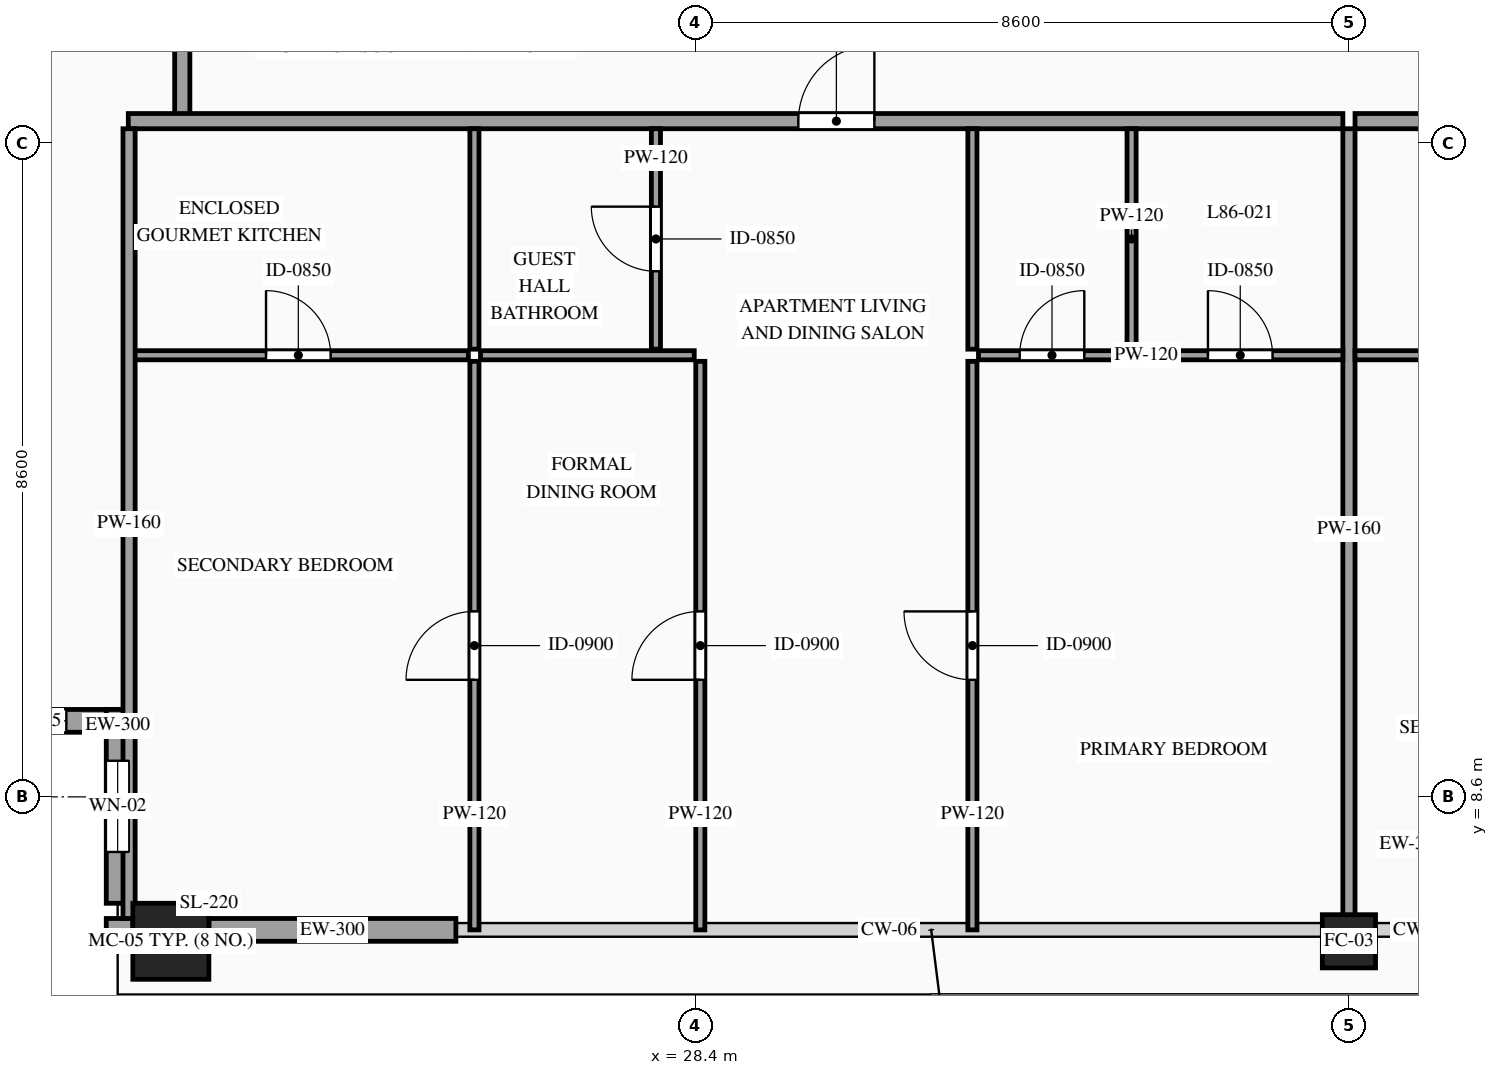
"""IFC4 building model, lengths in metres.
Left out: names, types, materials, properties, quantities, classifications, styles, units other than length and angle.
Written with IfcOpenShell. Run it as: python <this file> out.ifc"""

import sys

from ifc_helpers import new_model, si_unit, direction, frame, frame_2d, origin, origin_2d, place, context, subcontext, project, spatial, rectangle, hollow_rectangle, extrude, source, transform, mapped, element, fill, save


model = new_model("IFC4")
c1 = context("Model", 3, precision=1e-05, world=origin(), true_north=direction((0.0, 1.0)))
c2 = subcontext(c1, "Body", "Model", "MODEL_VIEW")
j1 = project(units=[si_unit("LENGTHUNIT", "METRE"), si_unit("PLANEANGLEUNIT", "RADIAN")], contexts=[c1])
p1 = place(None, origin())
s1 = spatial("IfcSite", under=j1, at=p1, CompositionType="ELEMENT")
p2 = place(p1, origin())
s2 = spatial("IfcBuilding", under=s1, at=p2, CompositionType="ELEMENT")
p3 = place(p2, frame((0.0, 0.0, 321.7)))
s3 = spatial("IfcBuildingStorey", under=s2, at=p3, CompositionType="ELEMENT", Elevation=321.7)
m1 = source(origin(), c2, "Body", "SweptSolid", [
    extrude(hollow_rectangle(XDim=1.0, YDim=1.0, WallThickness=0.048, at=origin_2d()), origin(), (0.0, 0.0, 1.0), 3.5),
])
p4 = place(p3, frame((21.5, 6.7, 0.0), z_axis=(0.0, 0.0, 1.0), x_axis=(1.0, 0.0, 0.0)))
e1 = element("IfcColumn", 1, at=p4, inside=s3, PredefinedType="COLUMN", context=c2, shape_type="MappedRepresentation", body=[
    mapped(m1, transform((0.0, 0.0, 0.0), scale=1.0)),
])
m2 = source(origin(), c2, "Body", "SweptSolid", [
    extrude(hollow_rectangle(XDim=0.7, YDim=0.7, WallThickness=0.032, at=origin_2d()), origin(), (0.0, 0.0, 1.0), 3.5),
])
p5 = place(p3, frame((37.0, 6.7, 0.0), z_axis=(0.0, 0.0, 1.0), x_axis=(1.0, 0.0, 0.0)))
e2 = element("IfcColumn", 2, at=p5, inside=s3, PredefinedType="COLUMN", context=c2, shape_type="MappedRepresentation", body=[
    mapped(m2, transform((0.0, 0.0, 0.0), scale=1.0)),
])
p6 = place(p3, frame((18.4, 9.6, 0.0), z_axis=(0.0, 0.0, 1.0), x_axis=(1.0, 0.0, 0.0)))
e3 = element("IfcWall", 3, at=p6, inside=s3, PredefinedType="SOLIDWALL", context=c2, shape_type="SweptSolid", body=[
    extrude(rectangle(XDim=2.55, YDim=0.3, at=frame_2d((1.275, 0.0))), origin(), (0.0, 0.0, 1.0), 3.28),
])
p7 = place(p6, frame((0.825, 0.0, 0.85)))
e4 = element("IfcOpeningElement", 4, at=p7, cuts=e3, PredefinedType="OPENING", context=c2, shape_type="SweptSolid", body=[
    extrude(rectangle(XDim=0.9, YDim=1.5, at=frame_2d((0.45, 0.75))), frame((0.0, 0.165, 0.0), z_axis=(0.0, -1.0, 0.0), x_axis=(1.0, 0.0, 0.0)), (0.0, 0.0, 1.0), 0.33),
])
p8 = place(p3, frame((20.8, 9.75, 0.0), z_axis=(0.0, 0.0, 1.0), x_axis=(0.0, -1.0, 0.0)))
e5 = element("IfcWall", 5, at=p8, inside=s3, PredefinedType="SOLIDWALL", context=c2, shape_type="SweptSolid", body=[
    extrude(rectangle(XDim=2.55, YDim=0.3, at=frame_2d((1.275, 0.0))), origin(), (0.0, 0.0, 1.0), 3.28),
])
p9 = place(p8, frame((0.675, 0.0, 0.85)))
e6 = element("IfcOpeningElement", 6, at=p9, cuts=e5, PredefinedType="OPENING", context=c2, shape_type="SweptSolid", body=[
    extrude(rectangle(XDim=1.2, YDim=2.1, at=frame_2d((0.6, 1.05))), frame((0.0, 0.165, 0.0), z_axis=(0.0, -1.0, 0.0), x_axis=(1.0, 0.0, 0.0)), (0.0, 0.0, 1.0), 0.33),
])
m3 = source(origin(), c2, "Body", "SweptSolid", [
    extrude(rectangle(XDim=0.35, YDim=0.3, at=frame_2d((0.175, 0.0))), origin(), (0.0, 0.0, 1.0), 3.28),
])
p10 = place(p3, frame((20.65, 6.85, 0.0), z_axis=(0.0, 0.0, 1.0), x_axis=(1.0, 0.0, 0.0)))
e7 = element("IfcWall", 7, at=p10, inside=s3, PredefinedType="SOLIDWALL", context=c2, shape_type="MappedRepresentation", body=[
    mapped(m3, transform((0.0, 0.0, 0.0), scale=1.0)),
])
m4 = source(origin(), c2, "Body", "SweptSolid", [
    extrude(rectangle(XDim=3.25, YDim=0.3, at=frame_2d((1.625, 0.0))), origin(), (0.0, 0.0, 1.0), 2.885),
])
p11 = place(p3, frame((22.0, 6.85, 0.0), z_axis=(0.0, 0.0, 1.0), x_axis=(1.0, 0.0, 0.0)))
e8 = element("IfcWall", 8, at=p11, inside=s3, PredefinedType="SOLIDWALL", context=c2, shape_type="MappedRepresentation", body=[
    mapped(m4, transform((0.0, 0.0, 0.0), scale=1.0)),
])
m5 = source(origin(), c2, "Body", "SweptSolid", [
    extrude(rectangle(XDim=1.7, YDim=0.2, at=frame_2d((0.85, 0.0))), origin(), (0.0, 0.0, 1.0), 3.28),
])
p12 = place(p3, frame((21.65, 17.55, 0.0), z_axis=(0.0, 0.0, 1.0), x_axis=(0.0, 1.0, 0.0)))
e9 = element("IfcWall", 9, at=p12, inside=s3, PredefinedType="PARTITIONING", context=c2, shape_type="MappedRepresentation", body=[
    mapped(m5, transform((0.0, 0.0, 0.0), scale=1.0)),
])
p13 = place(p3, frame((20.94, 17.49, 0.0), z_axis=(0.0, 0.0, 1.0), x_axis=(1.0, 0.0, 0.0)))
e10 = element("IfcWall", 10, at=p13, inside=s3, PredefinedType="PARTITIONING", context=c2, shape_type="SweptSolid", body=[
    extrude(rectangle(XDim=15.98, YDim=0.2, at=frame_2d((7.99, 0.0))), origin(), (0.0, 0.0, 1.0), 3.28),
])
p14 = place(p13, frame((8.816, 0.0, 0.0)))
e11 = element("IfcOpeningElement", 11, at=p14, cuts=e10, PredefinedType="OPENING", context=c2, shape_type="SweptSolid", body=[
    extrude(rectangle(XDim=1.0, YDim=2.2, at=frame_2d((0.5, 1.1))), frame((0.0, 0.115, 0.0), z_axis=(0.0, -1.0, 0.0), x_axis=(1.0, 0.0, 0.0)), (0.0, 0.0, 1.0), 0.23),
])
m6 = source(origin(), c2, "Body", "SweptSolid", [
    extrude(rectangle(XDim=10.54, YDim=0.16, at=frame_2d((5.27, 0.0))), origin(), (0.0, 0.0, 1.0), 2.787),
])
p15 = place(p3, frame((37.0, 6.85, 0.0), z_axis=(0.0, 0.0, 1.0), x_axis=(0.0, 1.0, 0.0)))
e12 = element("IfcWall", 12, at=p15, inside=s3, PredefinedType="PARTITIONING", context=c2, shape_type="MappedRepresentation", body=[
    mapped(m6, transform((0.0, 0.0, 0.0), scale=1.0)),
])
p16 = place(p3, frame((20.94, 14.41, 0.0), z_axis=(0.0, 0.0, 1.0), x_axis=(1.0, 0.0, 0.0)))
e13 = element("IfcWall", 13, at=p16, inside=s3, PredefinedType="PARTITIONING", context=c2, shape_type="SweptSolid", body=[
    extrude(rectangle(XDim=4.474, YDim=0.12, at=frame_2d((2.237, 0.0))), origin(), (0.0, 0.0, 1.0), 3.28),
])
p17 = place(p16, frame((1.812, 0.0, 0.0)))
e14 = element("IfcOpeningElement", 14, at=p17, cuts=e13, PredefinedType="OPENING", context=c2, shape_type="SweptSolid", body=[
    extrude(rectangle(XDim=0.85, YDim=2.1, at=frame_2d((0.425, 1.05))), frame((0.0, 0.075, 0.0), z_axis=(0.0, -1.0, 0.0), x_axis=(1.0, 0.0, 0.0)), (0.0, 0.0, 1.0), 0.15),
])
m7 = source(origin(), c2, "Body", "SweptSolid", [
    extrude(rectangle(XDim=2.9, YDim=0.12, at=frame_2d((1.45, 0.0))), origin(), (0.0, 0.0, 1.0), 3.28),
])
p18 = place(p3, frame((25.494, 14.49, 0.0), z_axis=(0.0, 0.0, 1.0), x_axis=(0.0, 1.0, 0.0)))
e15 = element("IfcWall", 15, at=p18, inside=s3, PredefinedType="PARTITIONING", context=c2, shape_type="MappedRepresentation", body=[
    mapped(m7, transform((0.0, 0.0, 0.0), scale=1.0)),
])
p19 = place(p3, frame((27.882, 14.49, 0.0), z_axis=(0.0, 0.0, 1.0), x_axis=(0.0, 1.0, 0.0)))
e16 = element("IfcWall", 16, at=p19, inside=s3, PredefinedType="PARTITIONING", context=c2, shape_type="SweptSolid", body=[
    extrude(rectangle(XDim=2.9, YDim=0.12, at=frame_2d((1.45, 0.0))), origin(), (0.0, 0.0, 1.0), 3.28),
])
p20 = place(p19, frame((1.025, 0.0, 0.0)))
e17 = element("IfcOpeningElement", 17, at=p20, cuts=e16, PredefinedType="OPENING", context=c2, shape_type="SweptSolid", body=[
    extrude(rectangle(XDim=0.85, YDim=2.1, at=frame_2d((0.425, 1.05))), frame((0.0, 0.075, 0.0), z_axis=(0.0, -1.0, 0.0), x_axis=(1.0, 0.0, 0.0)), (0.0, 0.0, 1.0), 0.15),
])
for number, where, z_axis, x_axis in (
    (18, (34.14, 14.49, 0.0), (0.0, 0.0, 1.0), (0.0, 1.0, 0.0)),
    (19, (32.046, 14.49, 0.0), (0.0, 0.0, 1.0), (0.0, 1.0, 0.0)),
):
    element("IfcWall", number, at=place(p3, frame(where, z_axis=z_axis, x_axis=x_axis)), inside=s3, PredefinedType="PARTITIONING", context=c2, shape_type="MappedRepresentation", body=[
        mapped(m7, transform((0.0, 0.0, 0.0), scale=1.0)),
    ])
p21 = place(p3, frame((25.494, 6.85, 0.0), z_axis=(0.0, 0.0, 1.0), x_axis=(0.0, 1.0, 0.0)))
e20 = element("IfcWall", 20, at=p21, inside=s3, PredefinedType="PARTITIONING", context=c2, shape_type="SweptSolid", body=[
    extrude(rectangle(XDim=7.48, YDim=0.12, at=frame_2d((3.74, 0.0))), origin(), (0.0, 0.0, 1.0), 3.28),
])
p22 = place(p21, frame((3.29, 0.0, 0.0)))
e21 = element("IfcOpeningElement", 21, at=p22, cuts=e20, PredefinedType="OPENING", context=c2, shape_type="SweptSolid", body=[
    extrude(rectangle(XDim=0.9, YDim=2.15, at=frame_2d((0.45, 1.075))), frame((0.0, 0.075, 0.0), z_axis=(0.0, -1.0, 0.0), x_axis=(1.0, 0.0, 0.0)), (0.0, 0.0, 1.0), 0.15),
])
p23 = place(p3, frame((32.126, 14.41, 0.0), z_axis=(0.0, 0.0, 1.0), x_axis=(1.0, 0.0, 0.0)))
e22 = element("IfcWall", 22, at=p23, inside=s3, PredefinedType="PARTITIONING", context=c2, shape_type="SweptSolid", body=[
    extrude(rectangle(XDim=4.794, YDim=0.12, at=frame_2d((2.397, 0.0))), origin(), (0.0, 0.0, 1.0), 3.28),
])
p24 = place(p23, frame((3.019, 0.0, 0.0)))
e23 = element("IfcOpeningElement", 23, at=p24, cuts=e22, PredefinedType="OPENING", context=c2, shape_type="SweptSolid", body=[
    extrude(rectangle(XDim=0.85, YDim=2.1, at=frame_2d((0.425, 1.05))), frame((0.0, 0.075, 0.0), z_axis=(0.0, -1.0, 0.0), x_axis=(1.0, 0.0, 0.0)), (0.0, 0.0, 1.0), 0.15),
])
p25 = place(p23, frame((0.542, 0.0, 0.0)))
e24 = element("IfcOpeningElement", 24, at=p25, cuts=e22, PredefinedType="OPENING", context=c2, shape_type="SweptSolid", body=[
    extrude(rectangle(XDim=0.85, YDim=2.1, at=frame_2d((0.425, 1.05))), frame((0.0, 0.075, 0.0), z_axis=(0.0, -1.0, 0.0), x_axis=(1.0, 0.0, 0.0)), (0.0, 0.0, 1.0), 0.15),
])
p26 = place(p3, frame((32.046, 6.85, 0.0), z_axis=(0.0, 0.0, 1.0), x_axis=(0.0, 1.0, 0.0)))
e25 = element("IfcWall", 25, at=p26, inside=s3, PredefinedType="PARTITIONING", context=c2, shape_type="SweptSolid", body=[
    extrude(rectangle(XDim=7.48, YDim=0.12, at=frame_2d((3.74, 0.0))), origin(), (0.0, 0.0, 1.0), 3.28),
])
p27 = place(p26, frame((3.29, 0.0, 0.0)))
e26 = element("IfcOpeningElement", 26, at=p27, cuts=e25, PredefinedType="OPENING", context=c2, shape_type="SweptSolid", body=[
    extrude(rectangle(XDim=0.9, YDim=2.15, at=frame_2d((0.45, 1.075))), frame((0.0, 0.075, 0.0), z_axis=(0.0, -1.0, 0.0), x_axis=(1.0, 0.0, 0.0)), (0.0, 0.0, 1.0), 0.15),
])
m8 = source(origin(), c2, "Body", "SweptSolid", [
    extrude(rectangle(XDim=2.812, YDim=0.12, at=frame_2d((1.406, 0.0))), origin(), (0.0, 0.0, 1.0), 3.28),
])
p28 = place(p3, frame((25.574, 14.41, 0.0), z_axis=(0.0, 0.0, 1.0), x_axis=(1.0, 0.0, 0.0)))
e27 = element("IfcWall", 27, at=p28, inside=s3, PredefinedType="PARTITIONING", context=c2, shape_type="MappedRepresentation", body=[
    mapped(m8, transform((0.0, 0.0, 0.0), scale=1.0)),
])
p29 = place(p3, frame((28.466, 6.85, 0.0), z_axis=(0.0, 0.0, 1.0), x_axis=(0.0, 1.0, 0.0)))
e28 = element("IfcWall", 28, at=p29, inside=s3, PredefinedType="PARTITIONING", context=c2, shape_type="SweptSolid", body=[
    extrude(rectangle(XDim=7.48, YDim=0.12, at=frame_2d((3.74, 0.0))), origin(), (0.0, 0.0, 1.0), 3.28),
])
p30 = place(p29, frame((3.29, 0.0, 0.0)))
e29 = element("IfcOpeningElement", 29, at=p30, cuts=e28, PredefinedType="OPENING", context=c2, shape_type="SweptSolid", body=[
    extrude(rectangle(XDim=0.9, YDim=2.15, at=frame_2d((0.45, 1.075))), frame((0.0, 0.075, 0.0), z_axis=(0.0, -1.0, 0.0), x_axis=(1.0, 0.0, 0.0)), (0.0, 0.0, 1.0), 0.15),
])
p31 = place(p3, frame((37.08, 17.49, 0.0), z_axis=(0.0, 0.0, 1.0), x_axis=(1.0, 0.0, 0.0)))
e30 = element("IfcWall", 30, at=p31, inside=s3, PredefinedType="PARTITIONING", context=c2, shape_type="SweptSolid", body=[
    extrude(rectangle(XDim=15.98, YDim=0.2, at=frame_2d((7.99, 0.0))), origin(), (0.0, 0.0, 1.0), 3.28),
])
p32 = place(p31, frame((8.816, 0.0, 0.0)))
e31 = element("IfcOpeningElement", 31, at=p32, cuts=e30, PredefinedType="OPENING", context=c2, shape_type="SweptSolid", body=[
    extrude(rectangle(XDim=1.0, YDim=2.2, at=frame_2d((0.5, 1.1))), frame((0.0, 0.115, 0.0), z_axis=(0.0, -1.0, 0.0), x_axis=(1.0, 0.0, 0.0)), (0.0, 0.0, 1.0), 0.23),
])
m9 = source(origin(), c2, "Body", "SweptSolid", [
    extrude(rectangle(XDim=10.39, YDim=0.16, at=frame_2d((5.195, 0.0))), origin(), (0.0, 0.0, 1.0), 3.28),
])
p33 = place(p3, frame((20.95, 7.0, 0.0), z_axis=(0.0, 0.0, 1.0), x_axis=(0.0, 1.0, 0.0)))
e32 = element("IfcWall", 32, at=p33, inside=s3, PredefinedType="PARTITIONING", context=c2, shape_type="MappedRepresentation", body=[
    mapped(m9, transform((0.0, 0.0, 0.0), scale=1.0)),
])
p34 = place(p3, frame((37.08, 14.41, 0.0), z_axis=(0.0, 0.0, 1.0), x_axis=(1.0, 0.0, 0.0)))
e33 = element("IfcWall", 33, at=p34, inside=s3, PredefinedType="PARTITIONING", context=c2, shape_type="SweptSolid", body=[
    extrude(rectangle(XDim=4.474, YDim=0.12, at=frame_2d((2.237, 0.0))), origin(), (0.0, 0.0, 1.0), 3.28),
])
p35 = place(p34, frame((1.812, 0.0, 0.0)))
e34 = element("IfcOpeningElement", 34, at=p35, cuts=e33, PredefinedType="OPENING", context=c2, shape_type="SweptSolid", body=[
    extrude(rectangle(XDim=0.85, YDim=2.1, at=frame_2d((0.425, 1.05))), frame((0.0, 0.075, 0.0), z_axis=(0.0, -1.0, 0.0), x_axis=(1.0, 0.0, 0.0)), (0.0, 0.0, 1.0), 0.15),
])
m10 = source(origin(), c2, "Body", "SweptSolid", [
    extrude(rectangle(XDim=0.9, YDim=1.5, at=frame_2d((0.45, 0.75))), frame((0.0, 0.03, 0.0), z_axis=(0.0, -1.0, 0.0), x_axis=(1.0, 0.0, 0.0)), (0.0, 0.0, 1.0), 0.06),
])
p36 = place(p7, origin())
e35 = element("IfcWindow", 35, at=p36, inside=s3, PartitioningType="SINGLE_PANEL", PredefinedType="WINDOW", context=c2, shape_type="MappedRepresentation", body=[
    mapped(m10, transform((0.0, 0.0, 0.0), scale=1.0)),
])
fill(e4, e35)
m11 = source(origin(), c2, "Body", "SweptSolid", [
    extrude(rectangle(XDim=1.2, YDim=2.1, at=frame_2d((0.6, 1.05))), frame((0.0, 0.03, 0.0), z_axis=(0.0, -1.0, 0.0), x_axis=(1.0, 0.0, 0.0)), (0.0, 0.0, 1.0), 0.06),
])
p37 = place(p9, origin())
e36 = element("IfcWindow", 36, at=p37, inside=s3, PartitioningType="SINGLE_PANEL", PredefinedType="WINDOW", context=c2, shape_type="MappedRepresentation", body=[
    mapped(m11, transform((0.0, 0.0, 0.0), scale=1.0)),
])
fill(e6, e36)
m12 = source(origin(), c2, "Body", "SweptSolid", [
    extrude(rectangle(XDim=1.0, YDim=2.2, at=frame_2d((0.5, 1.1))), frame((0.0, 0.025, 0.0), z_axis=(0.0, -1.0, 0.0), x_axis=(1.0, 0.0, 0.0)), (0.0, 0.0, 1.0), 0.05),
])
p38 = place(p14, origin())
e37 = element("IfcDoor", 37, at=p38, inside=s3, OperationType="SINGLE_SWING_RIGHT", PredefinedType="DOOR", context=c2, shape_type="MappedRepresentation", body=[
    mapped(m12, transform((0.0, 0.0, 0.0), scale=1.0)),
])
fill(e11, e37)
m13 = source(origin(), c2, "Body", "SweptSolid", [
    extrude(rectangle(XDim=0.85, YDim=2.1, at=frame_2d((0.425, 1.05))), frame((0.0, 0.025, 0.0), z_axis=(0.0, -1.0, 0.0), x_axis=(1.0, 0.0, 0.0)), (0.0, 0.0, 1.0), 0.05),
])
p39 = place(p17, origin())
e38 = element("IfcDoor", 38, at=p39, inside=s3, OperationType="SINGLE_SWING_LEFT", PredefinedType="DOOR", context=c2, shape_type="MappedRepresentation", body=[
    mapped(m13, transform((0.0, 0.0, 0.0), scale=1.0)),
])
fill(e14, e38)
p40 = place(p20, origin())
e39 = element("IfcDoor", 39, at=p40, inside=s3, OperationType="SINGLE_SWING_RIGHT", PredefinedType="DOOR", context=c2, shape_type="MappedRepresentation", body=[
    mapped(m13, transform((0.0, 0.0, 0.0), scale=1.0)),
])
fill(e17, e39)
p41 = place(p24, origin())
e40 = element("IfcDoor", 40, at=p41, inside=s3, OperationType="SINGLE_SWING_LEFT", PredefinedType="DOOR", context=c2, shape_type="MappedRepresentation", body=[
    mapped(m13, transform((0.0, 0.0, 0.0), scale=1.0)),
])
fill(e23, e40)
p42 = place(p25, origin())
e41 = element("IfcDoor", 41, at=p42, inside=s3, OperationType="SINGLE_SWING_RIGHT", PredefinedType="DOOR", context=c2, shape_type="MappedRepresentation", body=[
    mapped(m13, transform((0.0, 0.0, 0.0), scale=1.0)),
])
fill(e24, e41)
m14 = source(origin(), c2, "Body", "SweptSolid", [
    extrude(rectangle(XDim=0.9, YDim=2.15, at=frame_2d((0.45, 1.075))), frame((0.0, 0.025, 0.0), z_axis=(0.0, -1.0, 0.0), x_axis=(1.0, 0.0, 0.0)), (0.0, 0.0, 1.0), 0.05),
])
p43 = place(p22, origin())
e42 = element("IfcDoor", 42, at=p43, inside=s3, OperationType="SINGLE_SWING_LEFT", PredefinedType="DOOR", context=c2, shape_type="MappedRepresentation", body=[
    mapped(m14, transform((0.0, 0.0, 0.0), scale=1.0)),
])
fill(e21, e42)
p44 = place(p27, origin())
e43 = element("IfcDoor", 43, at=p44, inside=s3, OperationType="SINGLE_SWING_RIGHT", PredefinedType="DOOR", context=c2, shape_type="MappedRepresentation", body=[
    mapped(m14, transform((0.0, 0.0, 0.0), scale=1.0)),
])
fill(e26, e43)
p45 = place(p30, origin())
e44 = element("IfcDoor", 44, at=p45, inside=s3, OperationType="SINGLE_SWING_LEFT", PredefinedType="DOOR", context=c2, shape_type="MappedRepresentation", body=[
    mapped(m14, transform((0.0, 0.0, 0.0), scale=1.0)),
])
fill(e29, e44)
save(model, sys.argv[1])
